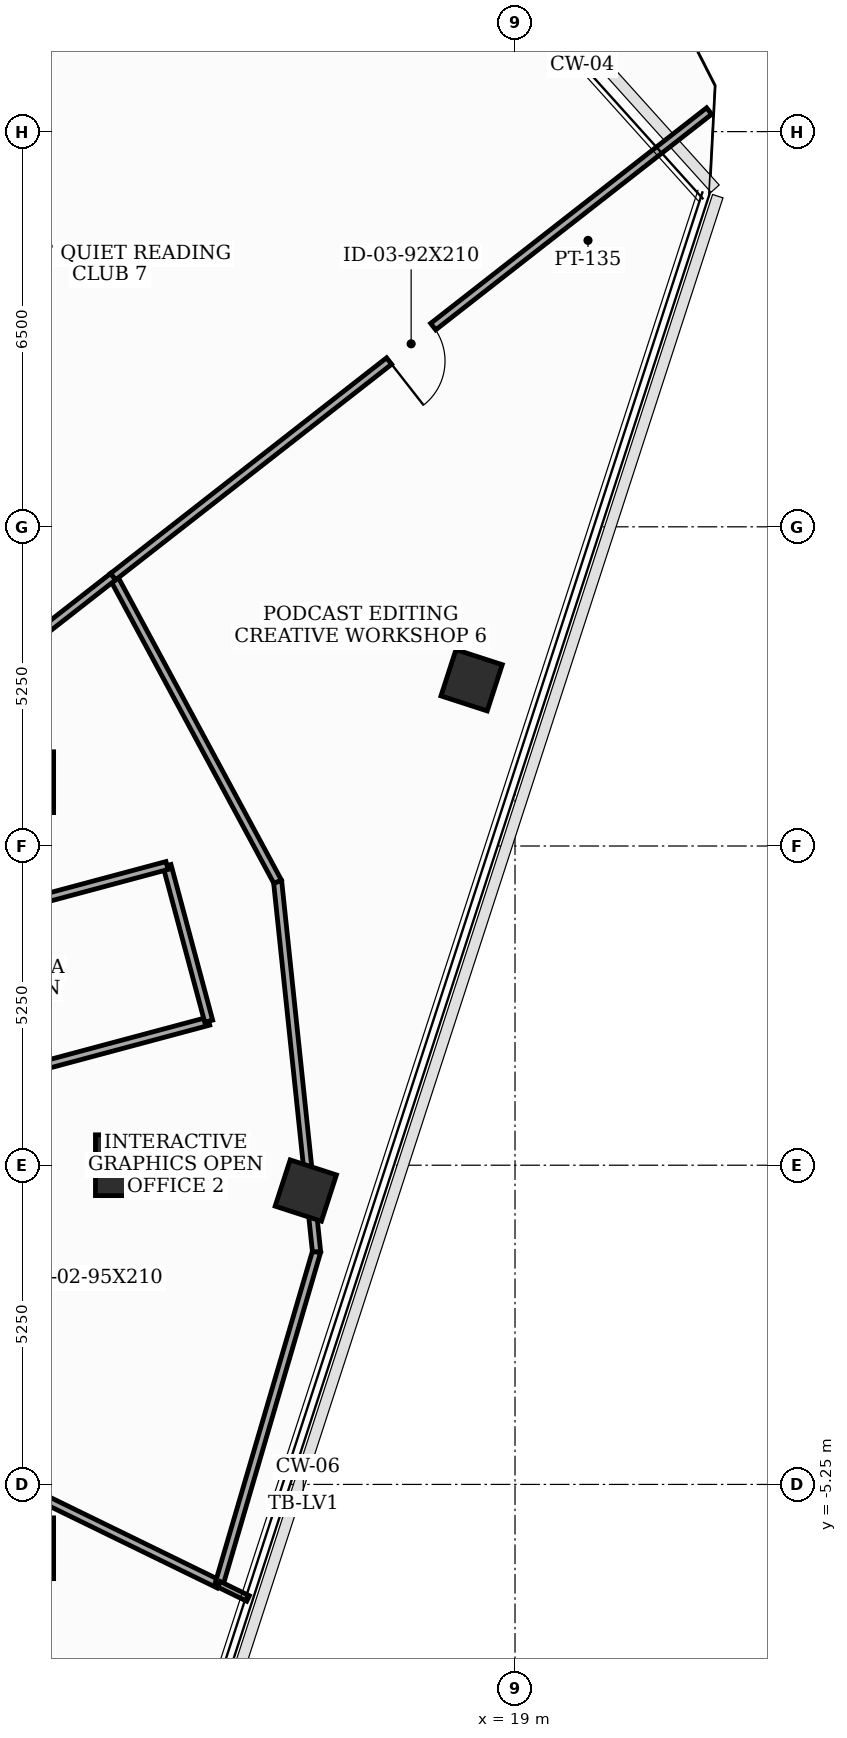
"""IFC4 building model, lengths in metres.
Left out: names, types, materials, properties, quantities, classifications, styles, units other than length and angle.
Written with IfcOpenShell. Run it as: python <this file> out.ifc"""

import sys

from ifc_helpers import new_model, si_unit, direction, frame, frame_2d, origin, origin_2d, place, context, subcontext, project, spatial, rectangle, extrude, element, fill, save


model = new_model("IFC4")
c1 = context("Model", 3, precision=1e-05, world=origin(), true_north=direction((0.0, 1.0)))
c2 = subcontext(c1, "Body", "Model", "MODEL_VIEW")
j1 = project(units=[si_unit("LENGTHUNIT", "METRE"), si_unit("PLANEANGLEUNIT", "RADIAN")], contexts=[c1])
p1 = place(None, origin())
s1 = spatial("IfcSite", under=j1, at=p1, CompositionType="ELEMENT")
p2 = place(p1, origin())
s2 = spatial("IfcBuilding", under=s1, at=p2, CompositionType="ELEMENT")
p3 = place(p2, frame((0.0, 0.0, 294.3)))
s3 = spatial("IfcBuildingStorey", under=s2, at=p3, CompositionType="ELEMENT", Elevation=294.3)
for number, where, z_axis, x_axis in (
    (1, (12.6, 0.0, 0.0), (0.0, 0.0, 1.0), (1.0, 0.0, 0.0)),
    (2, (10.912, 6.3, 0.0), (0.0, 0.0, 1.0), (1.0, 0.0, 0.0)),
    (3, (10.912, -6.3, 0.0), (0.0, 0.0, 1.0), (1.0, 0.0, 0.0)),
):
    element("IfcColumn", number, at=place(p3, frame(where, z_axis=z_axis, x_axis=x_axis)), inside=s3, PredefinedType="COLUMN", context=c2, shape_type="SweptSolid", body=[
        extrude(rectangle(XDim=1.0, YDim=1.0, at=origin_2d()), origin(), (0.0, 0.0, 1.0), 3.7),
    ])
for number, where, z_axis, x_axis in (
    (4, (15.559, -0.417, 0.0), (0.0, 0.0, 1.0), (0.309, 0.951, 0.0)),
    (5, (18.286, 7.976, 0.0), (0.0, 0.0, 1.0), (0.309, 0.951, 0.0)),
):
    element("IfcColumn", number, at=place(p3, frame(where, z_axis=z_axis, x_axis=x_axis)), inside=s3, PredefinedType="COLUMN", context=c2, shape_type="SweptSolid", body=[
        extrude(rectangle(XDim=0.8, YDim=0.8, at=origin_2d()), origin(), (0.0, 0.0, 1.0), 3.7),
    ])
p4 = place(p3, frame((10.65, 1.482, 0.0), z_axis=(0.0, 0.0, 1.0), x_axis=(0.965961397105, 0.2586862565, 0.0)))
e6 = element("IfcWall", 6, at=p4, inside=s3, PredefinedType="PARTITIONING", context=c2, shape_type="SweptSolid", body=[
    extrude(rectangle(XDim=3.429, YDim=0.135, at=frame_2d((1.714, 0.0))), origin(), (0.0, 0.0, 1.0), 2.885),
])
p5 = place(p3, frame((13.962, 2.369, 0.0), z_axis=(0.0, 0.0, 1.0), x_axis=(-0.258413725385, 0.966034340245, 0.0)))
e7 = element("IfcWall", 7, at=p5, inside=s3, PredefinedType="PARTITIONING", context=c2, shape_type="SweptSolid", body=[
    extrude(rectangle(XDim=2.65, YDim=0.135, at=frame_2d((1.325, 0.0))), origin(), (0.0, 0.0, 1.0), 3.5),
])
p6 = place(p3, frame((13.277, 4.929, 0.0), z_axis=(0.0, 0.0, 1.0), x_axis=(-0.965934830229, -0.258785439601, 0.0)))
e8 = element("IfcWall", 8, at=p6, inside=s3, PredefinedType="PARTITIONING", context=c2, shape_type="SweptSolid", body=[
    extrude(rectangle(XDim=2.72, YDim=0.135, at=frame_2d((1.36, 0.0))), origin(), (0.0, 0.0, 1.0), 2.885),
])
p7 = place(p3, frame((10.65, -5.194, 0.0), z_axis=(0.0, 0.0, 1.0), x_axis=(0.898781159743, -0.438397567159, 0.0)))
e9 = element("IfcWall", 9, at=p7, inside=s3, PredefinedType="PARTITIONING", context=c2, shape_type="SweptSolid", body=[
    extrude(rectangle(XDim=3.875, YDim=0.135, at=frame_2d((1.938, 0.0))), origin(), (0.0, 0.0, 1.0), 2.885),
])
p8 = place(p3, frame((14.133, -6.893, 0.0), z_axis=(0.0, 0.0, 1.0), x_axis=(0.281231672123, 0.959639904649, 0.0)))
e10 = element("IfcWall", 10, at=p8, inside=s3, PredefinedType="PARTITIONING", context=c2, shape_type="SweptSolid", body=[
    extrude(rectangle(XDim=5.7, YDim=0.135, at=frame_2d((2.85, 0.0))), origin(), (0.0, 0.0, 1.0), 3.5),
])
p9 = place(p3, frame((15.736, -1.423, 0.0), z_axis=(0.0, 0.0, 1.0), x_axis=(-0.104601717472, 0.994514193313, 0.0)))
e11 = element("IfcWall", 11, at=p9, inside=s3, PredefinedType="PARTITIONING", context=c2, shape_type="SweptSolid", body=[
    extrude(rectangle(XDim=6.12, YDim=0.135, at=frame_2d((3.06, 0.0))), origin(), (0.0, 0.0, 1.0), 3.035),
])
p10 = place(p3, frame((15.096, 4.663, 0.0), z_axis=(0.0, 0.0, 1.0), x_axis=(-0.474498198469, 0.88025647379, 0.0)))
e12 = element("IfcWall", 12, at=p10, inside=s3, PredefinedType="PARTITIONING", context=c2, shape_type="SweptSolid", body=[
    extrude(rectangle(XDim=5.7, YDim=0.135, at=frame_2d((2.85, 0.0))), origin(), (0.0, 0.0, 1.0), 3.035),
])
p11 = place(p3, frame((12.391, 9.681, 0.0), z_axis=(0.0, 0.0, 1.0), x_axis=(-0.788124883644, -0.615515367624, 0.0)))
e13 = element("IfcWall", 13, at=p11, inside=s3, PredefinedType="PARTITIONING", context=c2, shape_type="SweptSolid", body=[
    extrude(rectangle(XDim=2.209, YDim=0.135, at=frame_2d((1.104, 0.0))), origin(), (0.0, 0.0, 1.0), 3.5),
])
p12 = place(p3, frame((14.609, -7.126, 0.0), z_axis=(0.0, 0.0, 1.0), x_axis=(-0.898533726223, 0.438904480313, 0.0)))
e14 = element("IfcWall", 14, at=p12, inside=s3, PredefinedType="MOVABLE", context=c2, shape_type="SweptSolid", body=[
    extrude(rectangle(XDim=0.53, YDim=0.1, at=frame_2d((0.265, 0.0))), origin(), (0.0, 0.0, 1.0), 3.5),
])
p13 = place(p3, frame((22.192, 17.338, 0.0), z_axis=(0.0, 0.0, 1.0), x_axis=(-0.788015446076, -0.615655469192, 0.0)))
e15 = element("IfcWall", 15, at=p13, inside=s3, PredefinedType="PARTITIONING", context=c2, shape_type="SweptSolid", body=[
    extrude(rectangle(XDim=12.438, YDim=0.135, at=frame_2d((6.219, 0.0))), origin(), (0.0, 0.0, 1.0), 3.035),
])
p14 = place(p13, frame((5.759, 0.0, 0.0)))
e16 = element("IfcOpeningElement", 16, at=p14, cuts=e15, PredefinedType="OPENING", context=c2, shape_type="SweptSolid", body=[
    extrude(rectangle(XDim=0.92, YDim=2.1, at=frame_2d((0.46, 1.05))), frame((0.0, 0.077, 0.0), z_axis=(0.0, -1.0, 0.0), x_axis=(1.0, 0.0, 0.0)), (0.0, 0.0, 1.0), 0.155),
])
p15 = place(p14, origin())
e17 = element("IfcDoor", 17, at=p15, inside=s3, OperationType="SINGLE_SWING_RIGHT", PredefinedType="DOOR", context=c2, shape_type="SweptSolid", body=[
    extrude(rectangle(XDim=0.92, YDim=2.1, at=frame_2d((0.46, 1.05))), frame((0.0, 0.025, 0.0), z_axis=(0.0, -1.0, 0.0), x_axis=(1.0, 0.0, 0.0)), (0.0, 0.0, 1.0), 0.05),
])
fill(e16, e17)
save(model, sys.argv[1])
